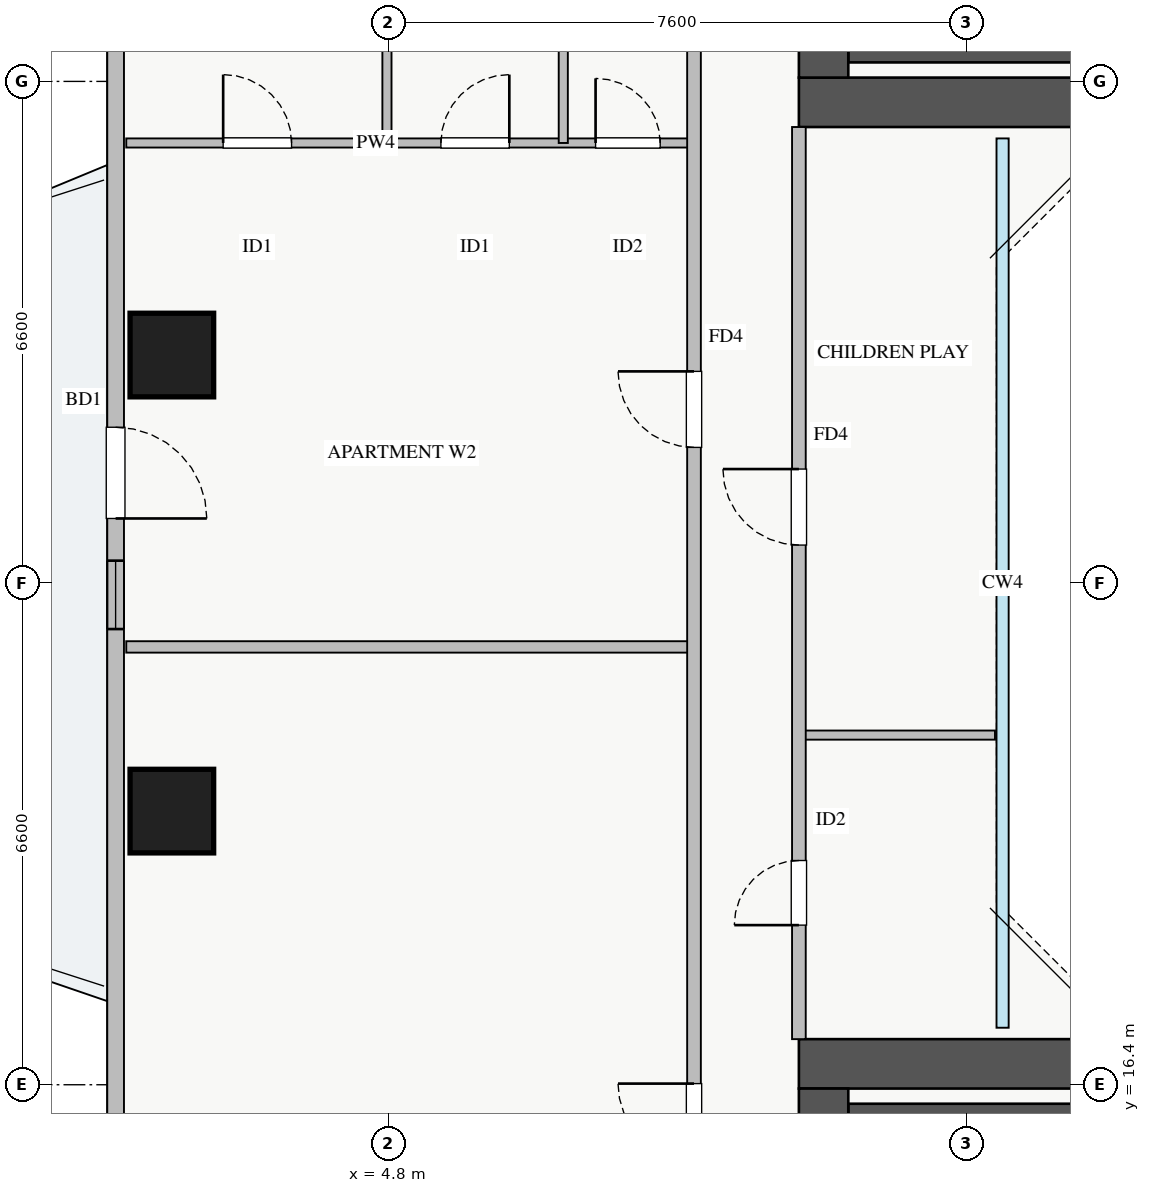
"""IFC4 building model, lengths in metres.
Left out: names, types, materials, properties, quantities, classifications, styles, units other than length and angle.
Written with IfcOpenShell. Run it as: python <this file> out.ifc"""

import sys

from ifc_helpers import new_model, si_unit, direction, frame, frame_2d, origin, origin_2d, place, context, subcontext, project, spatial, rectangle, extrude, source, transform, mapped, element, fill, save


model = new_model("IFC4")
c1 = context("Model", 3, precision=1e-05, world=origin(), true_north=direction((0.0, 1.0)))
c2 = subcontext(c1, "Body", "Model", "MODEL_VIEW")
j1 = project(units=[si_unit("LENGTHUNIT", "METRE"), si_unit("PLANEANGLEUNIT", "RADIAN")], contexts=[c1])
p1 = place(None, origin())
s1 = spatial("IfcSite", under=j1, at=p1, CompositionType="ELEMENT")
p2 = place(p1, origin())
s2 = spatial("IfcBuilding", under=s1, at=p2, CompositionType="ELEMENT")
p3 = place(p2, frame((0.0, 0.0, 136.0)))
s3 = spatial("IfcBuildingStorey", under=s2, at=p3, CompositionType="ELEMENT", Elevation=136.0)
for number, where, z_axis, x_axis in (
    (1, (10.85, 29.95, 0.0), (0.0, 0.0, 1.0), (1.0, 0.0, 0.0)),
    (2, (10.85, 16.05, 0.0), (0.0, 0.0, 1.0), (1.0, 0.0, 0.0)),
):
    element("IfcWall", number, at=place(p3, frame(where, z_axis=z_axis, x_axis=x_axis)), inside=s3, PredefinedType="SHEAR", context=c2, shape_type="SweptSolid", body=[
        extrude(rectangle(XDim=7.3, YDim=0.2, at=frame_2d((3.65, 0.0))), origin(), (0.0, 0.0, 1.0), 3.25),
    ])
p4 = place(p3, frame((10.2, 29.325, 0.0), z_axis=(0.0, 0.0, 1.0), x_axis=(1.0, 0.0, 0.0)))
e3 = element("IfcWall", 3, at=p4, inside=s3, PredefinedType="SHEAR", context=c2, shape_type="SweptSolid", body=[
    extrude(rectangle(XDim=17.6, YDim=0.65, at=frame_2d((8.8, 0.0))), origin(), (0.0, 0.0, 1.0), 3.25),
])
p5 = place(p3, frame((10.525, 29.65, 0.0), z_axis=(0.0, 0.0, 1.0), x_axis=(0.0, 1.0, 0.0)))
e4 = element("IfcWall", 4, at=p5, inside=s3, PredefinedType="SHEAR", context=c2, shape_type="SweptSolid", body=[
    extrude(rectangle(XDim=5.9, YDim=0.65, at=frame_2d((2.95, 0.0))), origin(), (0.0, 0.0, 1.0), 3.25),
])
p6 = place(p3, frame((10.2, 16.675, 0.0), z_axis=(0.0, 0.0, 1.0), x_axis=(1.0, 0.0, 0.0)))
e5 = element("IfcWall", 5, at=p6, inside=s3, PredefinedType="SHEAR", context=c2, shape_type="SweptSolid", body=[
    extrude(rectangle(XDim=17.6, YDim=0.65, at=frame_2d((8.8, 0.0))), origin(), (0.0, 0.0, 1.0), 3.25),
])
p7 = place(p3, frame((10.525, 10.45, 0.0), z_axis=(0.0, 0.0, 1.0), x_axis=(0.0, 1.0, 0.0)))
e6 = element("IfcWall", 6, at=p7, inside=s3, PredefinedType="SHEAR", context=c2, shape_type="SweptSolid", body=[
    extrude(rectangle(XDim=5.9, YDim=0.65, at=frame_2d((2.95, 0.0))), origin(), (0.0, 0.0, 1.0), 3.25),
])
m1 = source(origin(), c2, "Body", "SweptSolid", [
    extrude(rectangle(XDim=1.1, YDim=1.1, at=origin_2d()), origin(), (0.0, 0.0, 1.0), 3.25),
])
for number, where, z_axis, x_axis in (
    (7, (1.95, 26.0, 0.0), (0.0, 0.0, 1.0), (1.0, 0.0, 0.0)),
    (8, (1.95, 20.0, 0.0), (0.0, 0.0, 1.0), (1.0, 0.0, 0.0)),
):
    element("IfcColumn", number, at=place(p3, frame(where, z_axis=z_axis, x_axis=x_axis)), inside=s3, PredefinedType="COLUMN", context=c2, shape_type="MappedRepresentation", body=[
        mapped(m1, transform((0.0, 0.0, 0.0), x_axis=(1.0, 0.0, 0.0), y_axis=(0.0, 1.0, 0.0), z_axis=(0.0, 0.0, 1.0), scale=1.0)),
    ])
p8 = place(p3, frame((1.21, 10.55, 0.0), z_axis=(0.0, 0.0, 1.0), x_axis=(0.0, 1.0, 0.0)))
e9 = element("IfcWall", 9, at=p8, inside=s3, PredefinedType="STANDARD", context=c2, shape_type="SweptSolid", body=[
    extrude(rectangle(XDim=24.9, YDim=0.22, at=frame_2d((12.45, 0.0))), origin(), (0.0, 0.0, 1.0), 2.57),
])
p9 = place(p8, frame((13.3, 0.0, 0.0)))
e10 = element("IfcOpeningElement", 10, at=p9, cuts=e9, PredefinedType="OPENING", context=c2, shape_type="SweptSolid", body=[
    extrude(rectangle(XDim=1.2, YDim=2.1, at=frame_2d((0.6, 1.05))), frame((0.0, 0.12, 0.0), z_axis=(0.0, -1.0, 0.0), x_axis=(1.0, 0.0, 0.0)), (0.0, 0.0, 1.0), 0.24),
])
p10 = place(p8, frame((1.912, 0.0, 0.9)))
e11 = element("IfcOpeningElement", 11, at=p10, cuts=e9, PredefinedType="OPENING", context=c2, shape_type="SweptSolid", body=[
    extrude(rectangle(XDim=2.4, YDim=1.48, at=frame_2d((1.2, 0.74))), frame((0.0, 0.12, 0.0), z_axis=(0.0, -1.0, 0.0), x_axis=(1.0, 0.0, 0.0)), (0.0, 0.0, 1.0), 0.24),
])
p11 = place(p8, frame((20.737, 0.0, 0.9)))
e12 = element("IfcOpeningElement", 12, at=p11, cuts=e9, PredefinedType="OPENING", context=c2, shape_type="SweptSolid", body=[
    extrude(rectangle(XDim=2.1, YDim=1.48, at=frame_2d((1.05, 0.74))), frame((0.0, 0.12, 0.0), z_axis=(0.0, -1.0, 0.0), x_axis=(1.0, 0.0, 0.0)), (0.0, 0.0, 1.0), 0.24),
])
p12 = place(p8, frame((11.845, 0.0, 0.9)))
e13 = element("IfcOpeningElement", 13, at=p12, cuts=e9, PredefinedType="OPENING", context=c2, shape_type="SweptSolid", body=[
    extrude(rectangle(XDim=0.9, YDim=1.2, at=frame_2d((0.45, 0.6))), frame((0.0, 0.12, 0.0), z_axis=(0.0, -1.0, 0.0), x_axis=(1.0, 0.0, 0.0)), (0.0, 0.0, 1.0), 0.24),
])
p13 = place(p3, frame((1.35, 28.79, 0.0), z_axis=(0.0, 0.0, 1.0), x_axis=(1.0, 0.0, 0.0)))
e14 = element("IfcWall", 14, at=p13, inside=s3, PredefinedType="PLUMBINGWALL", context=c2, shape_type="SweptSolid", body=[
    extrude(rectangle(XDim=7.47, YDim=0.12, at=frame_2d((3.735, 0.0))), origin(), (0.0, 0.0, 1.0), 3.03),
])
p14 = place(p13, frame((1.275, 0.0, 0.0)))
e15 = element("IfcOpeningElement", 15, at=p14, cuts=e14, PredefinedType="OPENING", context=c2, shape_type="SweptSolid", body=[
    extrude(rectangle(XDim=0.9, YDim=2.05, at=frame_2d((0.45, 1.025))), frame((0.0, 0.07, 0.0), z_axis=(0.0, -1.0, 0.0), x_axis=(1.0, 0.0, 0.0)), (0.0, 0.0, 1.0), 0.14),
])
p15 = place(p13, frame((4.14, 0.0, 0.0)))
e16 = element("IfcOpeningElement", 16, at=p15, cuts=e14, PredefinedType="OPENING", context=c2, shape_type="SweptSolid", body=[
    extrude(rectangle(XDim=0.9, YDim=2.05, at=frame_2d((0.45, 1.025))), frame((0.0, 0.07, 0.0), z_axis=(0.0, -1.0, 0.0), x_axis=(1.0, 0.0, 0.0)), (0.0, 0.0, 1.0), 0.14),
])
p16 = place(p13, frame((6.175, 0.0, 0.0)))
e17 = element("IfcOpeningElement", 17, at=p16, cuts=e14, PredefinedType="OPENING", context=c2, shape_type="SweptSolid", body=[
    extrude(rectangle(XDim=0.85, YDim=2.05, at=frame_2d((0.425, 1.025))), frame((0.0, 0.07, 0.0), z_axis=(0.0, -1.0, 0.0), x_axis=(1.0, 0.0, 0.0)), (0.0, 0.0, 1.0), 0.14),
])
p17 = place(p3, frame((4.78, 28.79, 0.0), z_axis=(0.0, 0.0, 1.0), x_axis=(0.0, 1.0, 0.0)))
e18 = element("IfcWall", 18, at=p17, inside=s3, PredefinedType="PLUMBINGWALL", context=c2, shape_type="SweptSolid", body=[
    extrude(rectangle(XDim=7.19, YDim=0.12, at=frame_2d((3.595, 0.0))), origin(), (0.0, 0.0, 1.0), 3.03),
])
p18 = place(p3, frame((7.1, 28.79, 0.0), z_axis=(0.0, 0.0, 1.0), x_axis=(0.0, 1.0, 0.0)))
e19 = element("IfcWall", 19, at=p18, inside=s3, PredefinedType="PLUMBINGWALL", context=c2, shape_type="SweptSolid", body=[
    extrude(rectangle(XDim=7.19, YDim=0.12, at=frame_2d((3.595, 0.0))), origin(), (0.0, 0.0, 1.0), 2.537),
])
p19 = place(p3, frame((1.35, 22.16, 0.0), z_axis=(0.0, 0.0, 1.0), x_axis=(1.0, 0.0, 0.0)))
e20 = element("IfcWall", 20, at=p19, inside=s3, PredefinedType="PARTITIONING", context=c2, shape_type="SweptSolid", body=[
    extrude(rectangle(XDim=7.47, YDim=0.15, at=frame_2d((3.735, 0.0))), origin(), (0.0, 0.0, 1.0), 3.03),
])
p20 = place(p3, frame((8.82, 8.31, 0.0), z_axis=(0.0, 0.0, 1.0), x_axis=(0.0, 1.0, 0.0)))
e21 = element("IfcWall", 21, at=p20, inside=s3, PredefinedType="PARTITIONING", context=c2, shape_type="SweptSolid", body=[
    extrude(rectangle(XDim=29.13, YDim=0.18, at=frame_2d((14.565, 0.0))), origin(), (0.0, 0.0, 1.0), 3.03),
])
p21 = place(p20, frame((27.94, 0.0, 0.0)))
e22 = element("IfcOpeningElement", 22, at=p21, cuts=e21, PredefinedType="OPENING", context=c2, shape_type="SweptSolid", body=[
    extrude(rectangle(XDim=0.9, YDim=2.05, at=frame_2d((0.45, 1.025))), frame((0.0, 0.1, 0.0), z_axis=(0.0, -1.0, 0.0), x_axis=(1.0, 0.0, 0.0)), (0.0, 0.0, 1.0), 0.2),
])
p22 = place(p20, frame((0.24, 0.0, 0.0)))
e23 = element("IfcOpeningElement", 23, at=p22, cuts=e21, PredefinedType="OPENING", context=c2, shape_type="SweptSolid", body=[
    extrude(rectangle(XDim=0.9, YDim=2.05, at=frame_2d((0.45, 1.025))), frame((0.0, 0.1, 0.0), z_axis=(0.0, -1.0, 0.0), x_axis=(1.0, 0.0, 0.0)), (0.0, 0.0, 1.0), 0.2),
])
p23 = place(p20, frame((7.105, 0.0, 0.0)))
e24 = element("IfcOpeningElement", 24, at=p23, cuts=e21, PredefinedType="OPENING", context=c2, shape_type="SweptSolid", body=[
    extrude(rectangle(XDim=1.0, YDim=2.05, at=frame_2d((0.5, 1.025))), frame((0.0, 0.1, 0.0), z_axis=(0.0, -1.0, 0.0), x_axis=(1.0, 0.0, 0.0)), (0.0, 0.0, 1.0), 0.2),
])
p24 = place(p20, frame((16.475, 0.0, 0.0)))
e25 = element("IfcOpeningElement", 25, at=p24, cuts=e21, PredefinedType="OPENING", context=c2, shape_type="SweptSolid", body=[
    extrude(rectangle(XDim=1.0, YDim=2.05, at=frame_2d((0.5, 1.025))), frame((0.0, 0.1, 0.0), z_axis=(0.0, -1.0, 0.0), x_axis=(1.0, 0.0, 0.0)), (0.0, 0.0, 1.0), 0.2),
])
p25 = place(p3, frame((10.2, 21.0, 0.0), z_axis=(0.0, 0.0, 1.0), x_axis=(1.0, 0.0, 0.0)))
e26 = element("IfcWall", 26, at=p25, inside=s3, PredefinedType="PLUMBINGWALL", context=c2, shape_type="SweptSolid", body=[
    extrude(rectangle(XDim=2.58, YDim=0.12, at=frame_2d((1.29, 0.0))), origin(), (0.0, 0.0, 1.0), 3.03),
])
p26 = place(p3, frame((10.2, 17.0, 0.0), z_axis=(0.0, 0.0, 1.0), x_axis=(0.0, 1.0, 0.0)))
e27 = element("IfcWall", 27, at=p26, inside=s3, PredefinedType="PARTITIONING", context=c2, shape_type="SweptSolid", body=[
    extrude(rectangle(XDim=12.0, YDim=0.18, at=frame_2d((6.0, 0.0))), origin(), (0.0, 0.0, 1.0), 3.03),
])
p27 = place(p26, frame((1.5, 0.0, 0.0)))
e28 = element("IfcOpeningElement", 28, at=p27, cuts=e27, PredefinedType="OPENING", context=c2, shape_type="SweptSolid", body=[
    extrude(rectangle(XDim=0.85, YDim=2.05, at=frame_2d((0.425, 1.025))), frame((0.0, 0.1, 0.0), z_axis=(0.0, -1.0, 0.0), x_axis=(1.0, 0.0, 0.0)), (0.0, 0.0, 1.0), 0.2),
])
p28 = place(p26, frame((6.5, 0.0, 0.0)))
e29 = element("IfcOpeningElement", 29, at=p28, cuts=e27, PredefinedType="OPENING", context=c2, shape_type="SweptSolid", body=[
    extrude(rectangle(XDim=1.0, YDim=2.05, at=frame_2d((0.5, 1.025))), frame((0.0, 0.1, 0.0), z_axis=(0.0, -1.0, 0.0), x_axis=(1.0, 0.0, 0.0)), (0.0, 0.0, 1.0), 0.2),
])
m2 = source(origin(), c2, "Body", "SweptSolid", [
    extrude(rectangle(XDim=1.2, YDim=2.1, at=frame_2d((0.6, 1.05))), frame((0.0, 0.025, 0.0), z_axis=(0.0, -1.0, 0.0), x_axis=(1.0, 0.0, 0.0)), (0.0, 0.0, 1.0), 0.05),
])
p29 = place(p9, frame((1.2, 0.0, 0.0), z_axis=(0.0, 0.0, 1.0), x_axis=(-1.0, 0.0, 0.0)))
e30 = element("IfcDoor", 30, at=p29, inside=s3, OperationType="SINGLE_SWING_LEFT", PredefinedType="DOOR", context=c2, shape_type="MappedRepresentation", body=[
    mapped(m2, transform((0.0, 0.0, 0.0), x_axis=(1.0, 0.0, 0.0), y_axis=(0.0, 1.0, 0.0), z_axis=(0.0, 0.0, 1.0), scale=1.0)),
])
fill(e10, e30)
m3 = source(origin(), c2, "Body", "SweptSolid", [
    extrude(rectangle(XDim=0.9, YDim=2.05, at=frame_2d((0.45, 1.025))), frame((0.0, 0.025, 0.0), z_axis=(0.0, -1.0, 0.0), x_axis=(1.0, 0.0, 0.0)), (0.0, 0.0, 1.0), 0.05),
])
p30 = place(p14, origin())
e31 = element("IfcDoor", 31, at=p30, inside=s3, OperationType="SINGLE_SWING_LEFT", PredefinedType="DOOR", context=c2, shape_type="MappedRepresentation", body=[
    mapped(m3, transform((0.0, 0.0, 0.0), x_axis=(1.0, 0.0, 0.0), y_axis=(0.0, 1.0, 0.0), z_axis=(0.0, 0.0, 1.0), scale=1.0)),
])
fill(e15, e31)
p31 = place(p15, origin())
e32 = element("IfcDoor", 32, at=p31, inside=s3, OperationType="SINGLE_SWING_RIGHT", PredefinedType="DOOR", context=c2, shape_type="MappedRepresentation", body=[
    mapped(m3, transform((0.0, 0.0, 0.0), x_axis=(1.0, 0.0, 0.0), y_axis=(0.0, 1.0, 0.0), z_axis=(0.0, 0.0, 1.0), scale=1.0)),
])
fill(e16, e32)
m4 = source(origin(), c2, "Body", "SweptSolid", [
    extrude(rectangle(XDim=0.85, YDim=2.05, at=frame_2d((0.425, 1.025))), frame((0.0, 0.025, 0.0), z_axis=(0.0, -1.0, 0.0), x_axis=(1.0, 0.0, 0.0)), (0.0, 0.0, 1.0), 0.05),
])
p32 = place(p16, origin())
e33 = element("IfcDoor", 33, at=p32, inside=s3, OperationType="SINGLE_SWING_LEFT", PredefinedType="DOOR", context=c2, shape_type="MappedRepresentation", body=[
    mapped(m4, transform((0.0, 0.0, 0.0), x_axis=(1.0, 0.0, 0.0), y_axis=(0.0, 1.0, 0.0), z_axis=(0.0, 0.0, 1.0), scale=1.0)),
])
fill(e17, e33)
m5 = source(origin(), c2, "Body", "SweptSolid", [
    extrude(rectangle(XDim=1.0, YDim=2.05, at=frame_2d((0.5, 1.025))), frame((0.0, 0.025, 0.0), z_axis=(0.0, -1.0, 0.0), x_axis=(1.0, 0.0, 0.0)), (0.0, 0.0, 1.0), 0.05),
])
p33 = place(p23, origin())
e34 = element("IfcDoor", 34, at=p33, inside=s3, OperationType="SINGLE_SWING_RIGHT", PredefinedType="DOOR", context=c2, shape_type="MappedRepresentation", body=[
    mapped(m5, transform((0.0, 0.0, 0.0), x_axis=(1.0, 0.0, 0.0), y_axis=(0.0, 1.0, 0.0), z_axis=(0.0, 0.0, 1.0), scale=1.0)),
])
fill(e24, e34)
p34 = place(p24, origin())
e35 = element("IfcDoor", 35, at=p34, inside=s3, OperationType="SINGLE_SWING_RIGHT", PredefinedType="DOOR", context=c2, shape_type="MappedRepresentation", body=[
    mapped(m5, transform((0.0, 0.0, 0.0), x_axis=(1.0, 0.0, 0.0), y_axis=(0.0, 1.0, 0.0), z_axis=(0.0, 0.0, 1.0), scale=1.0)),
])
fill(e25, e35)
p35 = place(p27, origin())
e36 = element("IfcDoor", 36, at=p35, inside=s3, OperationType="SINGLE_SWING_LEFT", PredefinedType="DOOR", context=c2, shape_type="MappedRepresentation", body=[
    mapped(m4, transform((0.0, 0.0, 0.0), x_axis=(1.0, 0.0, 0.0), y_axis=(0.0, 1.0, 0.0), z_axis=(0.0, 0.0, 1.0), scale=1.0)),
])
fill(e28, e36)
p36 = place(p28, origin())
e37 = element("IfcDoor", 37, at=p36, inside=s3, OperationType="SINGLE_SWING_RIGHT", PredefinedType="DOOR", context=c2, shape_type="MappedRepresentation", body=[
    mapped(m5, transform((0.0, 0.0, 0.0), x_axis=(1.0, 0.0, 0.0), y_axis=(0.0, 1.0, 0.0), z_axis=(0.0, 0.0, 1.0), scale=1.0)),
])
fill(e29, e37)
m6 = source(origin(), c2, "Body", "SweptSolid", [
    extrude(rectangle(XDim=0.9, YDim=1.2, at=frame_2d((0.45, 0.6))), frame((0.0, 0.03, 0.0), z_axis=(0.0, -1.0, 0.0), x_axis=(1.0, 0.0, 0.0)), (0.0, 0.0, 1.0), 0.06),
])
p37 = place(p12, origin())
e38 = element("IfcWindow", 38, at=p37, inside=s3, PartitioningType="SINGLE_PANEL", PredefinedType="WINDOW", context=c2, shape_type="MappedRepresentation", body=[
    mapped(m6, transform((0.0, 0.0, 0.0), x_axis=(1.0, 0.0, 0.0), y_axis=(0.0, 1.0, 0.0), z_axis=(0.0, 0.0, 1.0), scale=1.0)),
])
fill(e13, e38)
save(model, sys.argv[1])
